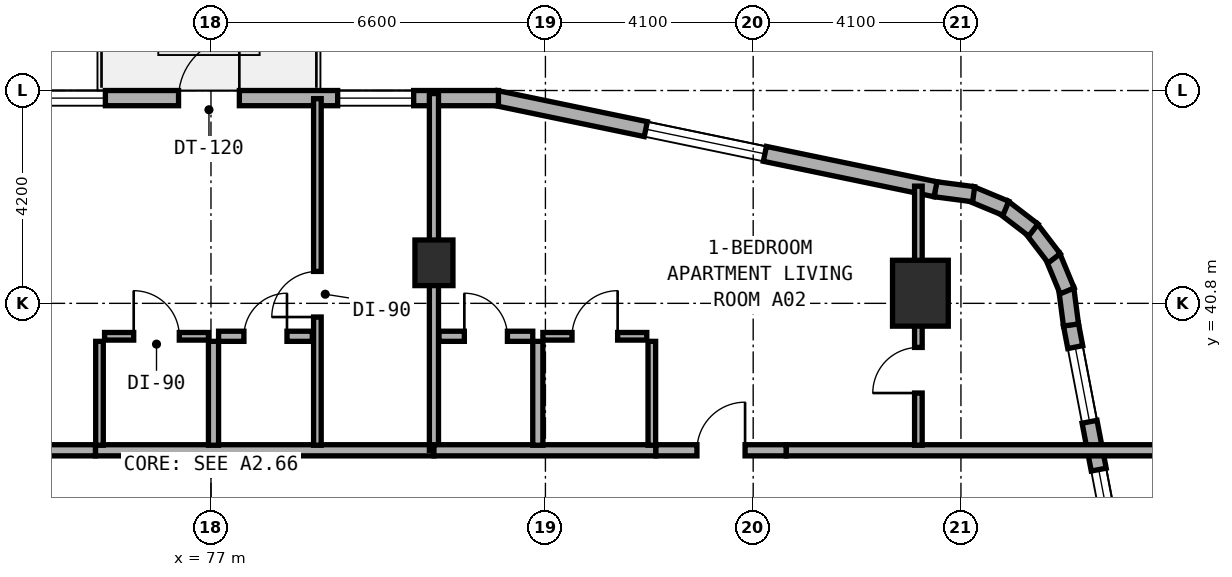
"""IFC4 building model, lengths in metres.
Left out: names, types, materials, properties, quantities, classifications, styles, units other than length and angle.
Written with IfcOpenShell. Run it as: python <this file> out.ifc"""

import sys

from ifc_helpers import new_model, si_unit, direction, frame, frame_2d, origin, origin_2d, place, context, subcontext, project, spatial, rectangle, extrude, element, fill, save


model = new_model("IFC4")
c1 = context("Model", 3, precision=1e-05, world=origin(), true_north=direction((0.0, 1.0)))
c2 = subcontext(c1, "Body", "Model", "MODEL_VIEW")
j1 = project(units=[si_unit("LENGTHUNIT", "METRE"), si_unit("PLANEANGLEUNIT", "RADIAN")], contexts=[c1])
p1 = place(None, origin())
s1 = spatial("IfcSite", under=j1, at=p1, CompositionType="ELEMENT")
p2 = place(p1, origin())
s2 = spatial("IfcBuilding", under=s1, at=p2, CompositionType="ELEMENT")
p3 = place(p2, frame((0.0, 0.0, 48.5)))
s3 = spatial("IfcBuildingStorey", under=s2, at=p3, CompositionType="ELEMENT", Elevation=48.5)
p4 = place(p3, frame((81.4, 41.6, 0.0), z_axis=(0.0, 0.0, 1.0), x_axis=(1.0, 0.0, 0.0)))
e1 = element("IfcColumn", 1, at=p4, inside=s3, PredefinedType="COLUMN", context=c2, shape_type="SweptSolid", body=[
    extrude(rectangle(XDim=0.75, YDim=0.9, at=origin_2d()), origin(), (0.0, 0.0, 1.0), 3.5),
])
p5 = place(p3, frame((91.0, 41.0, 0.0), z_axis=(0.0, 0.0, 1.0), x_axis=(1.0, 0.0, 0.0)))
e2 = element("IfcColumn", 2, at=p5, inside=s3, PredefinedType="COLUMN", context=c2, shape_type="SweptSolid", body=[
    extrude(rectangle(XDim=1.1, YDim=1.3, at=origin_2d()), origin(), (0.0, 0.0, 1.0), 3.5),
])
p6 = place(p3, frame((95.783, 30.918, 0.0), z_axis=(0.0, 0.0, 1.0), x_axis=(-0.188087874316, 0.982152203854, 0.0)))
e3 = element("IfcWall", 3, at=p6, inside=s3, PredefinedType="STANDARD", context=c2, shape_type="SweptSolid", body=[
    extrude(rectangle(XDim=9.634, YDim=0.3, at=frame_2d((4.817, 0.0))), origin(), (0.0, 0.0, 1.0), 3.25),
])
p7 = place(p6, frame((1.999, 0.0, 0.8)))
e4 = element("IfcOpeningElement", 4, at=p7, cuts=e3, PredefinedType="OPENING", context=c2, shape_type="SweptSolid", body=[
    extrude(rectangle(XDim=2.4, YDim=1.6, at=frame_2d((1.2, 0.8))), frame((0.0, 0.16, 0.0), z_axis=(0.0, -1.0, 0.0), x_axis=(1.0, 0.0, 0.0)), (0.0, 0.0, 1.0), 0.32),
])
p8 = place(p6, frame((5.521, 0.0, 0.85)))
e5 = element("IfcOpeningElement", 5, at=p8, cuts=e3, PredefinedType="OPENING", context=c2, shape_type="SweptSolid", body=[
    extrude(rectangle(XDim=1.2, YDim=1.5, at=frame_2d((0.6, 0.75))), frame((0.0, 0.16, 0.0), z_axis=(0.0, -1.0, 0.0), x_axis=(1.0, 0.0, 0.0)), (0.0, 0.0, 1.0), 0.32),
])
p9 = place(p6, frame((7.682, 0.0, 0.85)))
e6 = element("IfcOpeningElement", 6, at=p9, cuts=e3, PredefinedType="OPENING", context=c2, shape_type="SweptSolid", body=[
    extrude(rectangle(XDim=1.5, YDim=1.5, at=frame_2d((0.75, 0.75))), frame((0.0, 0.16, 0.0), z_axis=(0.0, -1.0, 0.0), x_axis=(1.0, 0.0, 0.0)), (0.0, 0.0, 1.0), 0.32),
])
p10 = place(p3, frame((93.972, 40.373, 0.0), z_axis=(0.0, 0.0, 1.0), x_axis=(-0.130255288807, 0.991480488834, 0.0)))
e7 = element("IfcWall", 7, at=p10, inside=s3, PredefinedType="STANDARD", context=c2, shape_type="SweptSolid", body=[
    extrude(rectangle(XDim=0.729, YDim=0.3, at=frame_2d((0.365, 0.0))), origin(), (0.0, 0.0, 1.0), 3.25),
])
p11 = place(p3, frame((93.896, 41.045, 0.0), z_axis=(0.0, 0.0, 1.0), x_axis=(-0.383267045233, 0.923637576129, 0.0)))
e8 = element("IfcWall", 8, at=p11, inside=s3, PredefinedType="STANDARD", context=c2, shape_type="SweptSolid", body=[
    extrude(rectangle(XDim=0.746, YDim=0.3, at=frame_2d((0.373, 0.0))), origin(), (0.0, 0.0, 1.0), 3.25),
])
for number, where, z_axis, x_axis in (
    (9, (93.641, 41.689, 0.0), (0.0, 0.0, 1.0), (-0.609, 0.793, 0.0)),
    (10, (93.229, 42.246, 0.0), (0.0, 0.0, 1.0), (-0.794, 0.608, 0.0)),
):
    element("IfcWall", number, at=place(p3, frame(where, z_axis=z_axis, x_axis=x_axis)), inside=s3, PredefinedType="STANDARD", context=c2, shape_type="SweptSolid", body=[
        extrude(rectangle(XDim=0.746, YDim=0.3, at=frame_2d((0.373, 0.0))), origin(), (0.0, 0.0, 1.0), 3.25),
    ])
p12 = place(p3, frame((92.686, 42.676, 0.0), z_axis=(0.0, 0.0, 1.0), x_axis=(-0.923637576129, 0.383267045233, 0.0)))
e11 = element("IfcWall", 11, at=p12, inside=s3, PredefinedType="STANDARD", context=c2, shape_type="SweptSolid", body=[
    extrude(rectangle(XDim=0.746, YDim=0.3, at=frame_2d((0.373, 0.0))), origin(), (0.0, 0.0, 1.0), 3.25),
])
p13 = place(p3, frame((92.051, 42.953, 0.0), z_axis=(0.0, 0.0, 1.0), x_axis=(-0.991559404866, 0.129653178221, 0.0)))
e12 = element("IfcWall", 12, at=p13, inside=s3, PredefinedType="STANDARD", context=c2, shape_type="SweptSolid", body=[
    extrude(rectangle(XDim=0.764, YDim=0.3, at=frame_2d((0.382, 0.0))), origin(), (0.0, 0.0, 1.0), 3.25),
])
p14 = place(p3, frame((91.298, 43.051, 0.0), z_axis=(0.0, 0.0, 1.0), x_axis=(-0.979120793441, 0.203279295189, 0.0)))
e13 = element("IfcWall", 13, at=p14, inside=s3, PredefinedType="STANDARD", context=c2, shape_type="SweptSolid", body=[
    extrude(rectangle(XDim=8.855, YDim=0.3, at=frame_2d((4.427, 0.0))), origin(), (0.0, 0.0, 1.0), 3.25),
])
p15 = place(p14, frame((3.439, 0.0, 0.8)))
e14 = element("IfcOpeningElement", 14, at=p15, cuts=e13, PredefinedType="OPENING", context=c2, shape_type="SweptSolid", body=[
    extrude(rectangle(XDim=2.4, YDim=1.6, at=frame_2d((1.2, 0.8))), frame((0.0, 0.16, 0.0), z_axis=(0.0, -1.0, 0.0), x_axis=(1.0, 0.0, 0.0)), (0.0, 0.0, 1.0), 0.32),
])
p16 = place(p3, frame((82.673, 44.85, 0.0), z_axis=(0.0, 0.0, 1.0), x_axis=(-1.0, 0.0, 0.0)))
e15 = element("IfcWall", 15, at=p16, inside=s3, PredefinedType="STANDARD", context=c2, shape_type="SweptSolid", body=[
    extrude(rectangle(XDim=11.391, YDim=0.3, at=frame_2d((5.696, 0.0))), origin(), (0.0, 0.0, 1.0), 3.25),
])
p17 = place(p16, frame((5.113, 0.0, 0.0)))
e16 = element("IfcOpeningElement", 16, at=p17, cuts=e15, PredefinedType="OPENING", context=c2, shape_type="SweptSolid", body=[
    extrude(rectangle(XDim=1.2, YDim=2.15, at=frame_2d((0.6, 1.075))), frame((0.0, 0.16, 0.0), z_axis=(0.0, -1.0, 0.0), x_axis=(1.0, 0.0, 0.0)), (0.0, 0.0, 1.0), 0.32),
])
p18 = place(p16, frame((1.673, 0.0, 0.85)))
e17 = element("IfcOpeningElement", 17, at=p18, cuts=e15, PredefinedType="OPENING", context=c2, shape_type="SweptSolid", body=[
    extrude(rectangle(XDim=1.5, YDim=1.5, at=frame_2d((0.75, 0.75))), frame((0.0, 0.16, 0.0), z_axis=(0.0, -1.0, 0.0), x_axis=(1.0, 0.0, 0.0)), (0.0, 0.0, 1.0), 0.32),
])
p19 = place(p16, frame((7.757, 0.0, 0.8)))
e18 = element("IfcOpeningElement", 18, at=p19, cuts=e15, PredefinedType="OPENING", context=c2, shape_type="SweptSolid", body=[
    extrude(rectangle(XDim=2.4, YDim=1.6, at=frame_2d((1.2, 0.8))), frame((0.0, 0.16, 0.0), z_axis=(0.0, -1.0, 0.0), x_axis=(1.0, 0.0, 0.0)), (0.0, 0.0, 1.0), 0.32),
])
p20 = place(p3, frame((74.72, 37.9, 0.0), z_axis=(0.0, 0.0, 1.0), x_axis=(1.0, 0.0, 0.0)))
e19 = element("IfcWall", 19, at=p20, inside=s3, PredefinedType="SOLIDWALL", context=c2, shape_type="SweptSolid", body=[
    extrude(rectangle(XDim=6.68, YDim=0.22, at=frame_2d((3.34, 0.0))), origin(), (0.0, 0.0, 1.0), 2.725),
])
p21 = place(p3, frame((65.85, 37.9, 0.0), z_axis=(0.0, 0.0, 1.0), x_axis=(1.0, 0.0, 0.0)))
e20 = element("IfcWall", 20, at=p21, inside=s3, PredefinedType="SOLIDWALL", context=c2, shape_type="SweptSolid", body=[
    extrude(rectangle(XDim=8.87, YDim=0.22, at=frame_2d((4.435, 0.0))), origin(), (0.0, 0.0, 1.0), 2.725),
])
p22 = place(p21, frame((3.96, 0.0, 0.0)))
e21 = element("IfcOpeningElement", 21, at=p22, cuts=e20, PredefinedType="OPENING", context=c2, shape_type="SweptSolid", body=[
    extrude(rectangle(XDim=0.95, YDim=2.1, at=frame_2d((0.475, 1.05))), frame((0.0, 0.12, 0.0), z_axis=(0.0, -1.0, 0.0), x_axis=(1.0, 0.0, 0.0)), (0.0, 0.0, 1.0), 0.24),
])
p23 = place(p3, frame((79.1, 38.0, 0.0), z_axis=(0.0, 0.0, 1.0), x_axis=(0.0, 1.0, 0.0)))
e22 = element("IfcWall", 22, at=p23, inside=s3, PredefinedType="PARTITIONING", context=c2, shape_type="SweptSolid", body=[
    extrude(rectangle(XDim=6.84, YDim=0.15, at=frame_2d((3.42, 0.0))), origin(), (0.0, 0.0, 1.0), 2.865),
])
p24 = place(p23, frame((2.53, 0.0, 0.0)))
e23 = element("IfcOpeningElement", 23, at=p24, cuts=e22, PredefinedType="OPENING", context=c2, shape_type="SweptSolid", body=[
    extrude(rectangle(XDim=0.9, YDim=2.1, at=frame_2d((0.45, 1.05))), frame((0.0, 0.085, 0.0), z_axis=(0.0, -1.0, 0.0), x_axis=(1.0, 0.0, 0.0)), (0.0, 0.0, 1.0), 0.17),
])
p25 = place(p3, frame((77.05, 38.0, 0.0), z_axis=(0.0, 0.0, 1.0), x_axis=(0.0, 1.0, 0.0)))
e24 = element("IfcWall", 24, at=p25, inside=s3, PredefinedType="PLUMBINGWALL", context=c2, shape_type="SweptSolid", body=[
    extrude(rectangle(XDim=2.05, YDim=0.2, at=frame_2d((1.025, 0.0))), origin(), (0.0, 0.0, 1.0), 2.985),
])
p26 = place(p3, frame((74.8, 38.0, 0.0), z_axis=(0.0, 0.0, 1.0), x_axis=(0.0, 1.0, 0.0)))
e25 = element("IfcWall", 25, at=p26, inside=s3, PredefinedType="PARTITIONING", context=c2, shape_type="SweptSolid", body=[
    extrude(rectangle(XDim=2.05, YDim=0.15, at=frame_2d((1.025, 0.0))), origin(), (0.0, 0.0, 1.0), 2.985),
])
p27 = place(p3, frame((77.15, 40.15, 0.0), z_axis=(0.0, 0.0, 1.0), x_axis=(1.0, 0.0, 0.0)))
e26 = element("IfcWall", 26, at=p27, inside=s3, PredefinedType="PLUMBINGWALL", context=c2, shape_type="SweptSolid", body=[
    extrude(rectangle(XDim=1.85, YDim=0.2, at=frame_2d((0.925, 0.0))), origin(), (0.0, 0.0, 1.0), 3.22),
])
p28 = place(p27, frame((0.5, 0.0, 0.0)))
e27 = element("IfcOpeningElement", 27, at=p28, cuts=e26, PredefinedType="OPENING", context=c2, shape_type="SweptSolid", body=[
    extrude(rectangle(XDim=0.85, YDim=2.1, at=frame_2d((0.425, 1.05))), frame((0.0, 0.11, 0.0), z_axis=(0.0, -1.0, 0.0), x_axis=(1.0, 0.0, 0.0)), (0.0, 0.0, 1.0), 0.22),
])
p29 = place(p3, frame((74.9, 40.15, 0.0), z_axis=(0.0, 0.0, 1.0), x_axis=(1.0, 0.0, 0.0)))
e28 = element("IfcWall", 28, at=p29, inside=s3, PredefinedType="PARTITIONING", context=c2, shape_type="SweptSolid", body=[
    extrude(rectangle(XDim=2.05, YDim=0.15, at=frame_2d((1.025, 0.0))), origin(), (0.0, 0.0, 1.0), 3.22),
])
p30 = place(p29, frame((0.575, 0.0, 0.0)))
e29 = element("IfcOpeningElement", 29, at=p30, cuts=e28, PredefinedType="OPENING", context=c2, shape_type="SweptSolid", body=[
    extrude(rectangle(XDim=0.9, YDim=2.1, at=frame_2d((0.45, 1.05))), frame((0.0, 0.085, 0.0), z_axis=(0.0, -1.0, 0.0), x_axis=(1.0, 0.0, 0.0)), (0.0, 0.0, 1.0), 0.17),
])
p31 = place(p3, frame((81.4, 37.9, 0.0), z_axis=(0.0, 0.0, 1.0), x_axis=(0.0, 1.0, 0.0)))
e30 = element("IfcWall", 30, at=p31, inside=s3, PredefinedType="SOLIDWALL", context=c2, shape_type="SweptSolid", body=[
    extrude(rectangle(XDim=7.04, YDim=0.18, at=frame_2d((3.52, 0.0))), origin(), (0.0, 0.0, 1.0), 2.725),
])
p32 = place(p3, frame((81.4, 37.9, 0.0), z_axis=(0.0, 0.0, 1.0), x_axis=(1.0, 0.0, 0.0)))
e31 = element("IfcWall", 31, at=p32, inside=s3, PredefinedType="SOLIDWALL", context=c2, shape_type="SweptSolid", body=[
    extrude(rectangle(XDim=4.38, YDim=0.22, at=frame_2d((2.19, 0.0))), origin(), (0.0, 0.0, 1.0), 2.725),
])
p33 = place(p3, frame((88.35, 37.9, 0.0), z_axis=(0.0, 0.0, 1.0), x_axis=(1.0, 0.0, 0.0)))
e32 = element("IfcWall", 32, at=p33, inside=s3, PredefinedType="SOLIDWALL", context=c2, shape_type="SweptSolid", body=[
    extrude(rectangle(XDim=7.41, YDim=0.22, at=frame_2d((3.705, 0.0))), origin(), (0.0, 0.0, 1.0), 2.865),
])
p34 = place(p3, frame((85.78, 37.9, 0.0), z_axis=(0.0, 0.0, 1.0), x_axis=(1.0, 0.0, 0.0)))
e33 = element("IfcWall", 33, at=p34, inside=s3, PredefinedType="SOLIDWALL", context=c2, shape_type="SweptSolid", body=[
    extrude(rectangle(XDim=2.57, YDim=0.22, at=frame_2d((1.285, 0.0))), origin(), (0.0, 0.0, 1.0), 3.22),
])
p35 = place(p34, frame((0.81, 0.0, 0.0)))
e34 = element("IfcOpeningElement", 34, at=p35, cuts=e33, PredefinedType="OPENING", context=c2, shape_type="SweptSolid", body=[
    extrude(rectangle(XDim=0.95, YDim=2.1, at=frame_2d((0.475, 1.05))), frame((0.0, 0.12, 0.0), z_axis=(0.0, -1.0, 0.0), x_axis=(1.0, 0.0, 0.0)), (0.0, 0.0, 1.0), 0.24),
])
p36 = place(p3, frame((90.96, 38.0, 0.0), z_axis=(0.0, 0.0, 1.0), x_axis=(0.0, 1.0, 0.0)))
e35 = element("IfcWall", 35, at=p36, inside=s3, PredefinedType="PARTITIONING", context=c2, shape_type="SweptSolid", body=[
    extrude(rectangle(XDim=5.113, YDim=0.15, at=frame_2d((2.557, 0.0))), origin(), (0.0, 0.0, 1.0), 2.865),
])
p37 = place(p36, frame((1.03, 0.0, 0.0)))
e36 = element("IfcOpeningElement", 36, at=p37, cuts=e35, PredefinedType="OPENING", context=c2, shape_type="SweptSolid", body=[
    extrude(rectangle(XDim=0.9, YDim=2.1, at=frame_2d((0.45, 1.05))), frame((0.0, 0.085, 0.0), z_axis=(0.0, -1.0, 0.0), x_axis=(1.0, 0.0, 0.0)), (0.0, 0.0, 1.0), 0.17),
])
p38 = place(p3, frame((83.45, 38.0, 0.0), z_axis=(0.0, 0.0, 1.0), x_axis=(0.0, 1.0, 0.0)))
e37 = element("IfcWall", 37, at=p38, inside=s3, PredefinedType="PLUMBINGWALL", context=c2, shape_type="SweptSolid", body=[
    extrude(rectangle(XDim=2.05, YDim=0.2, at=frame_2d((1.025, 0.0))), origin(), (0.0, 0.0, 1.0), 3.22),
])
p39 = place(p3, frame((85.7, 38.0, 0.0), z_axis=(0.0, 0.0, 1.0), x_axis=(0.0, 1.0, 0.0)))
e38 = element("IfcWall", 38, at=p39, inside=s3, PredefinedType="PARTITIONING", context=c2, shape_type="SweptSolid", body=[
    extrude(rectangle(XDim=2.05, YDim=0.15, at=frame_2d((1.025, 0.0))), origin(), (0.0, 0.0, 1.0), 3.22),
])
p40 = place(p3, frame((81.5, 40.15, 0.0), z_axis=(0.0, 0.0, 1.0), x_axis=(1.0, 0.0, 0.0)))
e39 = element("IfcWall", 39, at=p40, inside=s3, PredefinedType="PLUMBINGWALL", context=c2, shape_type="SweptSolid", body=[
    extrude(rectangle(XDim=1.85, YDim=0.2, at=frame_2d((0.925, 0.0))), origin(), (0.0, 0.0, 1.0), 2.725),
])
p41 = place(p40, frame((0.5, 0.0, 0.0)))
e40 = element("IfcOpeningElement", 40, at=p41, cuts=e39, PredefinedType="OPENING", context=c2, shape_type="SweptSolid", body=[
    extrude(rectangle(XDim=0.85, YDim=2.1, at=frame_2d((0.425, 1.05))), frame((0.0, 0.11, 0.0), z_axis=(0.0, -1.0, 0.0), x_axis=(1.0, 0.0, 0.0)), (0.0, 0.0, 1.0), 0.22),
])
p42 = place(p3, frame((83.55, 40.15, 0.0), z_axis=(0.0, 0.0, 1.0), x_axis=(1.0, 0.0, 0.0)))
e41 = element("IfcWall", 41, at=p42, inside=s3, PredefinedType="PARTITIONING", context=c2, shape_type="SweptSolid", body=[
    extrude(rectangle(XDim=2.05, YDim=0.15, at=frame_2d((1.025, 0.0))), origin(), (0.0, 0.0, 1.0), 3.22),
])
p43 = place(p42, frame((0.575, 0.0, 0.0)))
e42 = element("IfcOpeningElement", 42, at=p43, cuts=e41, PredefinedType="OPENING", context=c2, shape_type="SweptSolid", body=[
    extrude(rectangle(XDim=0.9, YDim=2.1, at=frame_2d((0.45, 1.05))), frame((0.0, 0.085, 0.0), z_axis=(0.0, -1.0, 0.0), x_axis=(1.0, 0.0, 0.0)), (0.0, 0.0, 1.0), 0.17),
])
p44 = place(p8, origin())
e43 = element("IfcWindow", 43, at=p44, inside=s3, PartitioningType="SINGLE_PANEL", PredefinedType="WINDOW", context=c2, shape_type="SweptSolid", body=[
    extrude(rectangle(XDim=1.2, YDim=1.5, at=frame_2d((0.6, 0.75))), frame((0.0, 0.03, 0.0), z_axis=(0.0, -1.0, 0.0), x_axis=(1.0, 0.0, 0.0)), (0.0, 0.0, 1.0), 0.06),
])
fill(e5, e43)
p45 = place(p9, origin())
e44 = element("IfcWindow", 44, at=p45, inside=s3, PartitioningType="SINGLE_PANEL", PredefinedType="WINDOW", context=c2, shape_type="SweptSolid", body=[
    extrude(rectangle(XDim=1.5, YDim=1.5, at=frame_2d((0.75, 0.75))), frame((0.0, 0.03, 0.0), z_axis=(0.0, -1.0, 0.0), x_axis=(1.0, 0.0, 0.0)), (0.0, 0.0, 1.0), 0.06),
])
fill(e6, e44)
p46 = place(p15, origin())
e45 = element("IfcWindow", 45, at=p46, inside=s3, PartitioningType="SINGLE_PANEL", PredefinedType="WINDOW", context=c2, shape_type="SweptSolid", body=[
    extrude(rectangle(XDim=2.4, YDim=1.6, at=frame_2d((1.2, 0.8))), frame((0.0, 0.03, 0.0), z_axis=(0.0, -1.0, 0.0), x_axis=(1.0, 0.0, 0.0)), (0.0, 0.0, 1.0), 0.06),
])
fill(e14, e45)
p47 = place(p17, frame((1.2, 0.0, 0.0), z_axis=(0.0, 0.0, 1.0), x_axis=(-1.0, 0.0, 0.0)))
e46 = element("IfcDoor", 46, at=p47, inside=s3, OperationType="SINGLE_SWING_RIGHT", PredefinedType="DOOR", context=c2, shape_type="SweptSolid", body=[
    extrude(rectangle(XDim=1.2, YDim=2.15, at=frame_2d((0.6, 1.075))), frame((0.0, 0.025, 0.0), z_axis=(0.0, -1.0, 0.0), x_axis=(1.0, 0.0, 0.0)), (0.0, 0.0, 1.0), 0.05),
])
fill(e16, e46)
p48 = place(p18, origin())
e47 = element("IfcWindow", 47, at=p48, inside=s3, PartitioningType="SINGLE_PANEL", PredefinedType="WINDOW", context=c2, shape_type="SweptSolid", body=[
    extrude(rectangle(XDim=1.5, YDim=1.5, at=frame_2d((0.75, 0.75))), frame((0.0, 0.03, 0.0), z_axis=(0.0, -1.0, 0.0), x_axis=(1.0, 0.0, 0.0)), (0.0, 0.0, 1.0), 0.06),
])
fill(e17, e47)
p49 = place(p19, origin())
e48 = element("IfcWindow", 48, at=p49, inside=s3, PartitioningType="SINGLE_PANEL", PredefinedType="WINDOW", context=c2, shape_type="SweptSolid", body=[
    extrude(rectangle(XDim=2.4, YDim=1.6, at=frame_2d((1.2, 0.8))), frame((0.0, 0.03, 0.0), z_axis=(0.0, -1.0, 0.0), x_axis=(1.0, 0.0, 0.0)), (0.0, 0.0, 1.0), 0.06),
])
fill(e18, e48)
p50 = place(p24, origin())
e49 = element("IfcDoor", 49, at=p50, inside=s3, OperationType="SINGLE_SWING_LEFT", PredefinedType="DOOR", context=c2, shape_type="SweptSolid", body=[
    extrude(rectangle(XDim=0.9, YDim=2.1, at=frame_2d((0.45, 1.05))), frame((0.0, 0.025, 0.0), z_axis=(0.0, -1.0, 0.0), x_axis=(1.0, 0.0, 0.0)), (0.0, 0.0, 1.0), 0.05),
])
fill(e23, e49)
p51 = place(p28, origin())
e50 = element("IfcDoor", 50, at=p51, inside=s3, OperationType="SINGLE_SWING_RIGHT", PredefinedType="DOOR", context=c2, shape_type="SweptSolid", body=[
    extrude(rectangle(XDim=0.85, YDim=2.1, at=frame_2d((0.425, 1.05))), frame((0.0, 0.025, 0.0), z_axis=(0.0, -1.0, 0.0), x_axis=(1.0, 0.0, 0.0)), (0.0, 0.0, 1.0), 0.05),
])
fill(e27, e50)
p52 = place(p30, origin())
e51 = element("IfcDoor", 51, at=p52, inside=s3, OperationType="SINGLE_SWING_LEFT", PredefinedType="DOOR", context=c2, shape_type="SweptSolid", body=[
    extrude(rectangle(XDim=0.9, YDim=2.1, at=frame_2d((0.45, 1.05))), frame((0.0, 0.025, 0.0), z_axis=(0.0, -1.0, 0.0), x_axis=(1.0, 0.0, 0.0)), (0.0, 0.0, 1.0), 0.05),
])
fill(e29, e51)
p53 = place(p35, origin())
e52 = element("IfcDoor", 52, at=p53, inside=s3, OperationType="SINGLE_SWING_RIGHT", PredefinedType="DOOR", context=c2, shape_type="SweptSolid", body=[
    extrude(rectangle(XDim=0.95, YDim=2.1, at=frame_2d((0.475, 1.05))), frame((0.0, 0.025, 0.0), z_axis=(0.0, -1.0, 0.0), x_axis=(1.0, 0.0, 0.0)), (0.0, 0.0, 1.0), 0.05),
])
fill(e34, e52)
p54 = place(p37, origin())
e53 = element("IfcDoor", 53, at=p54, inside=s3, OperationType="SINGLE_SWING_LEFT", PredefinedType="DOOR", context=c2, shape_type="SweptSolid", body=[
    extrude(rectangle(XDim=0.9, YDim=2.1, at=frame_2d((0.45, 1.05))), frame((0.0, 0.025, 0.0), z_axis=(0.0, -1.0, 0.0), x_axis=(1.0, 0.0, 0.0)), (0.0, 0.0, 1.0), 0.05),
])
fill(e36, e53)
p55 = place(p41, origin())
e54 = element("IfcDoor", 54, at=p55, inside=s3, OperationType="SINGLE_SWING_LEFT", PredefinedType="DOOR", context=c2, shape_type="SweptSolid", body=[
    extrude(rectangle(XDim=0.85, YDim=2.1, at=frame_2d((0.425, 1.05))), frame((0.0, 0.025, 0.0), z_axis=(0.0, -1.0, 0.0), x_axis=(1.0, 0.0, 0.0)), (0.0, 0.0, 1.0), 0.05),
])
fill(e40, e54)
p56 = place(p43, origin())
e55 = element("IfcDoor", 55, at=p56, inside=s3, OperationType="SINGLE_SWING_RIGHT", PredefinedType="DOOR", context=c2, shape_type="SweptSolid", body=[
    extrude(rectangle(XDim=0.9, YDim=2.1, at=frame_2d((0.45, 1.05))), frame((0.0, 0.025, 0.0), z_axis=(0.0, -1.0, 0.0), x_axis=(1.0, 0.0, 0.0)), (0.0, 0.0, 1.0), 0.05),
])
fill(e42, e55)
save(model, sys.argv[1])
